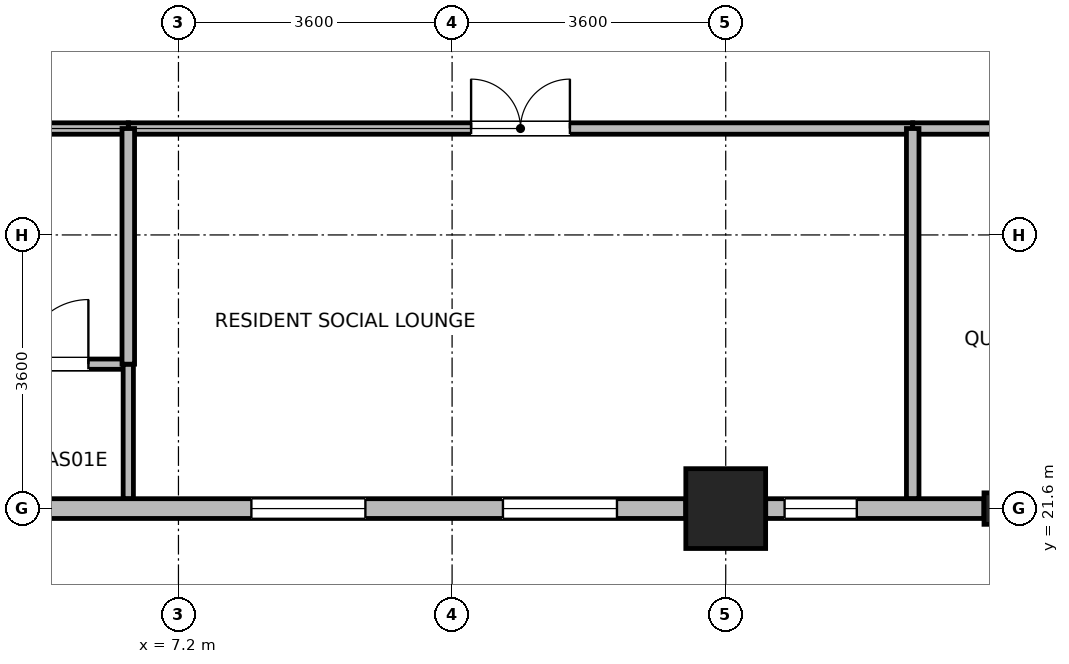
"""IFC4 building model, lengths in metres.
Left out: names, types, materials, properties, quantities, classifications, styles, units other than length and angle.
Written with IfcOpenShell. Run it as: python <this file> out.ifc"""

import sys

from ifc_helpers import new_model, si_unit, direction, frame, frame_2d, origin, origin_2d, place, context, subcontext, project, spatial, rectangle, i_section, extrude, source, transform, mapped, element, fill, save


model = new_model("IFC4")
c1 = context("Model", 3, precision=1e-05, world=origin(), true_north=direction((0.0, 1.0)))
c2 = subcontext(c1, "Body", "Model", "MODEL_VIEW")
j1 = project(units=[si_unit("LENGTHUNIT", "METRE"), si_unit("PLANEANGLEUNIT", "RADIAN")], contexts=[c1])
p1 = place(None, origin())
s1 = spatial("IfcSite", under=j1, at=p1, CompositionType="ELEMENT")
p2 = place(p1, origin())
s2 = spatial("IfcBuilding", under=s1, at=p2, CompositionType="ELEMENT")
p3 = place(p2, frame((0.0, 0.0, 180.9)))
s3 = spatial("IfcBuildingStorey", under=s2, at=p3, CompositionType="ELEMENT", Elevation=180.9)
m1 = source(origin(), c2, "Body", "SweptSolid", [
    extrude(rectangle(XDim=1.05, YDim=1.05, at=origin_2d()), origin(), (0.0, 0.0, 1.0), 3.7),
])
p4 = place(p3, frame((14.4, 21.6, 0.0), z_axis=(0.0, 0.0, 1.0), x_axis=(1.0, 0.0, 0.0)))
e1 = element("IfcColumn", 1, at=p4, inside=s3, PredefinedType="COLUMN", context=c2, shape_type="MappedRepresentation", body=[
    mapped(m1, transform((0.0, 0.0, 0.0), x_axis=(1.0, 0.0, 0.0), y_axis=(0.0, 1.0, 0.0), z_axis=(0.0, 0.0, 1.0), scale=1.0)),
])
m2 = source(origin(), c2, "Body", "SweptSolid", [
    extrude(i_section(OverallWidth=0.404, OverallDepth=0.414, WebThickness=0.021, FlangeThickness=0.028, FilletRadius=0.015, at=origin_2d()), origin(), (0.0, 0.0, 1.0), 3.7),
])
p5 = place(p3, frame((18.0, 21.6, 0.0), z_axis=(0.0, 0.0, 1.0), x_axis=(1.0, 0.0, 0.0)))
e2 = element("IfcColumn", 2, at=p5, inside=s3, PredefinedType="COLUMN", context=c2, shape_type="MappedRepresentation", body=[
    mapped(m2, transform((0.0, 0.0, 0.0), x_axis=(1.0, 0.0, 0.0), y_axis=(0.0, 1.0, 0.0), z_axis=(0.0, 0.0, 1.0), scale=1.0)),
])
p6 = place(p3, frame((13.874, 21.6, 0.0), z_axis=(0.0, 0.0, 1.0), x_axis=(-1.0, 0.0, 0.0)))
e3 = element("IfcWall", 3, at=p6, inside=s3, PredefinedType="STANDARD", context=c2, shape_type="SweptSolid", body=[
    extrude(rectangle(XDim=13.239, YDim=0.26, at=frame_2d((6.62, 0.0))), origin(), (0.0, 0.0, 1.0), 3.44),
])
p7 = place(p6, frame((0.905, 0.0, 0.85)))
e4 = element("IfcOpeningElement", 4, at=p7, cuts=e3, PredefinedType="OPENING", context=c2, shape_type="SweptSolid", body=[
    extrude(rectangle(XDim=1.5, YDim=1.85, at=frame_2d((0.75, 0.925))), frame((0.0, 0.14, 0.0), z_axis=(0.0, -1.0, 0.0), x_axis=(1.0, 0.0, 0.0)), (0.0, 0.0, 1.0), 0.28),
])
p8 = place(p6, frame((4.215, 0.0, 0.85)))
e5 = element("IfcOpeningElement", 5, at=p8, cuts=e3, PredefinedType="OPENING", context=c2, shape_type="SweptSolid", body=[
    extrude(rectangle(XDim=1.5, YDim=1.85, at=frame_2d((0.75, 0.925))), frame((0.0, 0.14, 0.0), z_axis=(0.0, -1.0, 0.0), x_axis=(1.0, 0.0, 0.0)), (0.0, 0.0, 1.0), 0.28),
])
p9 = place(p6, frame((10.834, 0.0, 0.85)))
e6 = element("IfcOpeningElement", 6, at=p9, cuts=e3, PredefinedType="OPENING", context=c2, shape_type="SweptSolid", body=[
    extrude(rectangle(XDim=1.5, YDim=1.85, at=frame_2d((0.75, 0.925))), frame((0.0, 0.14, 0.0), z_axis=(0.0, -1.0, 0.0), x_axis=(1.0, 0.0, 0.0)), (0.0, 0.0, 1.0), 0.28),
])
p10 = place(p3, frame((17.797, 21.6, 0.0), z_axis=(0.0, 0.0, 1.0), x_axis=(-1.0, 0.0, 0.0)))
e7 = element("IfcWall", 7, at=p10, inside=s3, PredefinedType="STANDARD", context=c2, shape_type="SweptSolid", body=[
    extrude(rectangle(XDim=2.871, YDim=0.26, at=frame_2d((1.436, 0.0))), origin(), (0.0, 0.0, 1.0), 2.99),
])
p11 = place(p10, frame((1.673, 0.0, 0.85)))
e8 = element("IfcOpeningElement", 8, at=p11, cuts=e7, PredefinedType="OPENING", context=c2, shape_type="SweptSolid", body=[
    extrude(rectangle(XDim=0.95, YDim=1.75, at=frame_2d((0.475, 0.875))), frame((0.0, 0.14, 0.0), z_axis=(0.0, -1.0, 0.0), x_axis=(1.0, 0.0, 0.0)), (0.0, 0.0, 1.0), 0.28),
])
p12 = place(p3, frame((4.64, 23.5, 0.0), z_axis=(0.0, 0.0, 1.0), x_axis=(1.0, 0.0, 0.0)))
e9 = element("IfcWall", 9, at=p12, inside=s3, PredefinedType="PARTITIONING", context=c2, shape_type="SweptSolid", body=[
    extrude(rectangle(XDim=1.9, YDim=0.135, at=frame_2d((0.95, 0.0))), origin(), (0.0, 0.0, 1.0), 3.44),
])
p13 = place(p12, frame((0.525, 0.0, 0.0)))
e10 = element("IfcOpeningElement", 10, at=p13, cuts=e9, PredefinedType="OPENING", context=c2, shape_type="SweptSolid", body=[
    extrude(rectangle(XDim=0.85, YDim=2.04, at=frame_2d((0.425, 1.02))), frame((0.0, 0.078, 0.0), z_axis=(0.0, -1.0, 0.0), x_axis=(1.0, 0.0, 0.0)), (0.0, 0.0, 1.0), 0.155),
])
p14 = place(p3, frame((6.54, 21.732, 0.0), z_axis=(0.0, 0.0, 1.0), x_axis=(0.0, 1.0, 0.0)))
e11 = element("IfcWall", 11, at=p14, inside=s3, PredefinedType="PARTITIONING", context=c2, shape_type="SweptSolid", body=[
    extrude(rectangle(XDim=1.768, YDim=0.135, at=frame_2d((0.884, 0.0))), origin(), (0.0, 0.0, 1.0), 3.44),
])
p15 = place(p3, frame((6.54, 26.6, 0.0), z_axis=(0.0, 0.0, 1.0), x_axis=(1.0, 0.0, 0.0)))
e12 = element("IfcWall", 12, at=p15, inside=s3, PredefinedType="PARTITIONING", context=c2, shape_type="SweptSolid", body=[
    extrude(rectangle(XDim=10.32, YDim=0.15, at=frame_2d((5.16, 0.0))), origin(), (0.0, 0.0, 1.0), 3.44),
])
p16 = place(p15, frame((4.51, 0.0, 0.0)))
e13 = element("IfcOpeningElement", 13, at=p16, cuts=e12, PredefinedType="OPENING", context=c2, shape_type="SweptSolid", body=[
    extrude(rectangle(XDim=1.3, YDim=2.12, at=frame_2d((0.65, 1.06))), frame((0.0, 0.085, 0.0), z_axis=(0.0, -1.0, 0.0), x_axis=(1.0, 0.0, 0.0)), (0.0, 0.0, 1.0), 0.17),
])
p17 = place(p3, frame((0.632, 26.6, 0.0), z_axis=(0.0, 0.0, 1.0), x_axis=(1.0, 0.0, 0.0)))
e14 = element("IfcWall", 14, at=p17, inside=s3, PredefinedType="PARTITIONING", context=c2, shape_type="SweptSolid", body=[
    extrude(rectangle(XDim=5.908, YDim=0.15, at=frame_2d((2.954, 0.0))), origin(), (0.0, 0.0, 1.0), 3.44),
])
p18 = place(p17, frame((2.479, 0.0, 0.0)))
e15 = element("IfcOpeningElement", 15, at=p18, cuts=e14, PredefinedType="OPENING", context=c2, shape_type="SweptSolid", body=[
    extrude(rectangle(XDim=0.95, YDim=2.1, at=frame_2d((0.475, 1.05))), frame((0.0, 0.085, 0.0), z_axis=(0.0, -1.0, 0.0), x_axis=(1.0, 0.0, 0.0)), (0.0, 0.0, 1.0), 0.17),
])
p19 = place(p3, frame((16.86, 26.6, 0.0), z_axis=(0.0, 0.0, 1.0), x_axis=(1.0, 0.0, 0.0)))
e16 = element("IfcWall", 16, at=p19, inside=s3, PredefinedType="PARTITIONING", context=c2, shape_type="SweptSolid", body=[
    extrude(rectangle(XDim=5.8, YDim=0.15, at=frame_2d((2.9, 0.0))), origin(), (0.0, 0.0, 1.0), 3.44),
])
p20 = place(p19, frame((2.25, 0.0, 0.0)))
e17 = element("IfcOpeningElement", 17, at=p20, cuts=e16, PredefinedType="OPENING", context=c2, shape_type="SweptSolid", body=[
    extrude(rectangle(XDim=1.3, YDim=2.12, at=frame_2d((0.65, 1.06))), frame((0.0, 0.085, 0.0), z_axis=(0.0, -1.0, 0.0), x_axis=(1.0, 0.0, 0.0)), (0.0, 0.0, 1.0), 0.17),
])
p21 = place(p3, frame((16.86, 21.732, 0.0), z_axis=(0.0, 0.0, 1.0), x_axis=(0.0, 1.0, 0.0)))
e18 = element("IfcWall", 18, at=p21, inside=s3, PredefinedType="PARTITIONING", context=c2, shape_type="SweptSolid", body=[
    extrude(rectangle(XDim=4.868, YDim=0.165, at=frame_2d((2.434, 0.0))), origin(), (0.0, 0.0, 1.0), 3.44),
])
p22 = place(p3, frame((6.54, 23.5, 0.0), z_axis=(0.0, 0.0, 1.0), x_axis=(0.0, 1.0, 0.0)))
e19 = element("IfcWall", 19, at=p22, inside=s3, PredefinedType="PARTITIONING", context=c2, shape_type="SweptSolid", body=[
    extrude(rectangle(XDim=3.1, YDim=0.165, at=frame_2d((1.55, 0.0))), origin(), (0.0, 0.0, 1.0), 3.44),
])
p23 = place(p7, origin())
e20 = element("IfcWindow", 20, at=p23, inside=s3, PartitioningType="SINGLE_PANEL", PredefinedType="WINDOW", context=c2, shape_type="SweptSolid", body=[
    extrude(rectangle(XDim=1.5, YDim=1.85, at=frame_2d((0.75, 0.925))), frame((0.0, 0.03, 0.0), z_axis=(0.0, -1.0, 0.0), x_axis=(1.0, 0.0, 0.0)), (0.0, 0.0, 1.0), 0.06),
])
fill(e4, e20)
p24 = place(p8, origin())
e21 = element("IfcWindow", 21, at=p24, inside=s3, PartitioningType="SINGLE_PANEL", PredefinedType="WINDOW", context=c2, shape_type="SweptSolid", body=[
    extrude(rectangle(XDim=1.5, YDim=1.85, at=frame_2d((0.75, 0.925))), frame((0.0, 0.03, 0.0), z_axis=(0.0, -1.0, 0.0), x_axis=(1.0, 0.0, 0.0)), (0.0, 0.0, 1.0), 0.06),
])
fill(e5, e21)
p25 = place(p11, origin())
e22 = element("IfcWindow", 22, at=p25, inside=s3, PartitioningType="SINGLE_PANEL", PredefinedType="WINDOW", context=c2, shape_type="SweptSolid", body=[
    extrude(rectangle(XDim=0.95, YDim=1.75, at=frame_2d((0.475, 0.875))), frame((0.0, 0.03, 0.0), z_axis=(0.0, -1.0, 0.0), x_axis=(1.0, 0.0, 0.0)), (0.0, 0.0, 1.0), 0.06),
])
fill(e8, e22)
p26 = place(p13, origin())
e23 = element("IfcDoor", 23, at=p26, inside=s3, OperationType="SINGLE_SWING_RIGHT", PredefinedType="DOOR", context=c2, shape_type="SweptSolid", body=[
    extrude(rectangle(XDim=0.85, YDim=2.04, at=frame_2d((0.425, 1.02))), frame((0.0, 0.025, 0.0), z_axis=(0.0, -1.0, 0.0), x_axis=(1.0, 0.0, 0.0)), (0.0, 0.0, 1.0), 0.05),
])
fill(e10, e23)
p27 = place(p16, origin())
e24 = element("IfcDoor", 24, at=p27, inside=s3, OperationType="DOUBLE_DOOR_SINGLE_SWING", PredefinedType="DOOR", context=c2, shape_type="SweptSolid", body=[
    extrude(rectangle(XDim=1.3, YDim=2.12, at=frame_2d((0.65, 1.06))), frame((0.0, 0.025, 0.0), z_axis=(0.0, -1.0, 0.0), x_axis=(1.0, 0.0, 0.0)), (0.0, 0.0, 1.0), 0.05),
])
fill(e13, e24)
save(model, sys.argv[1])
